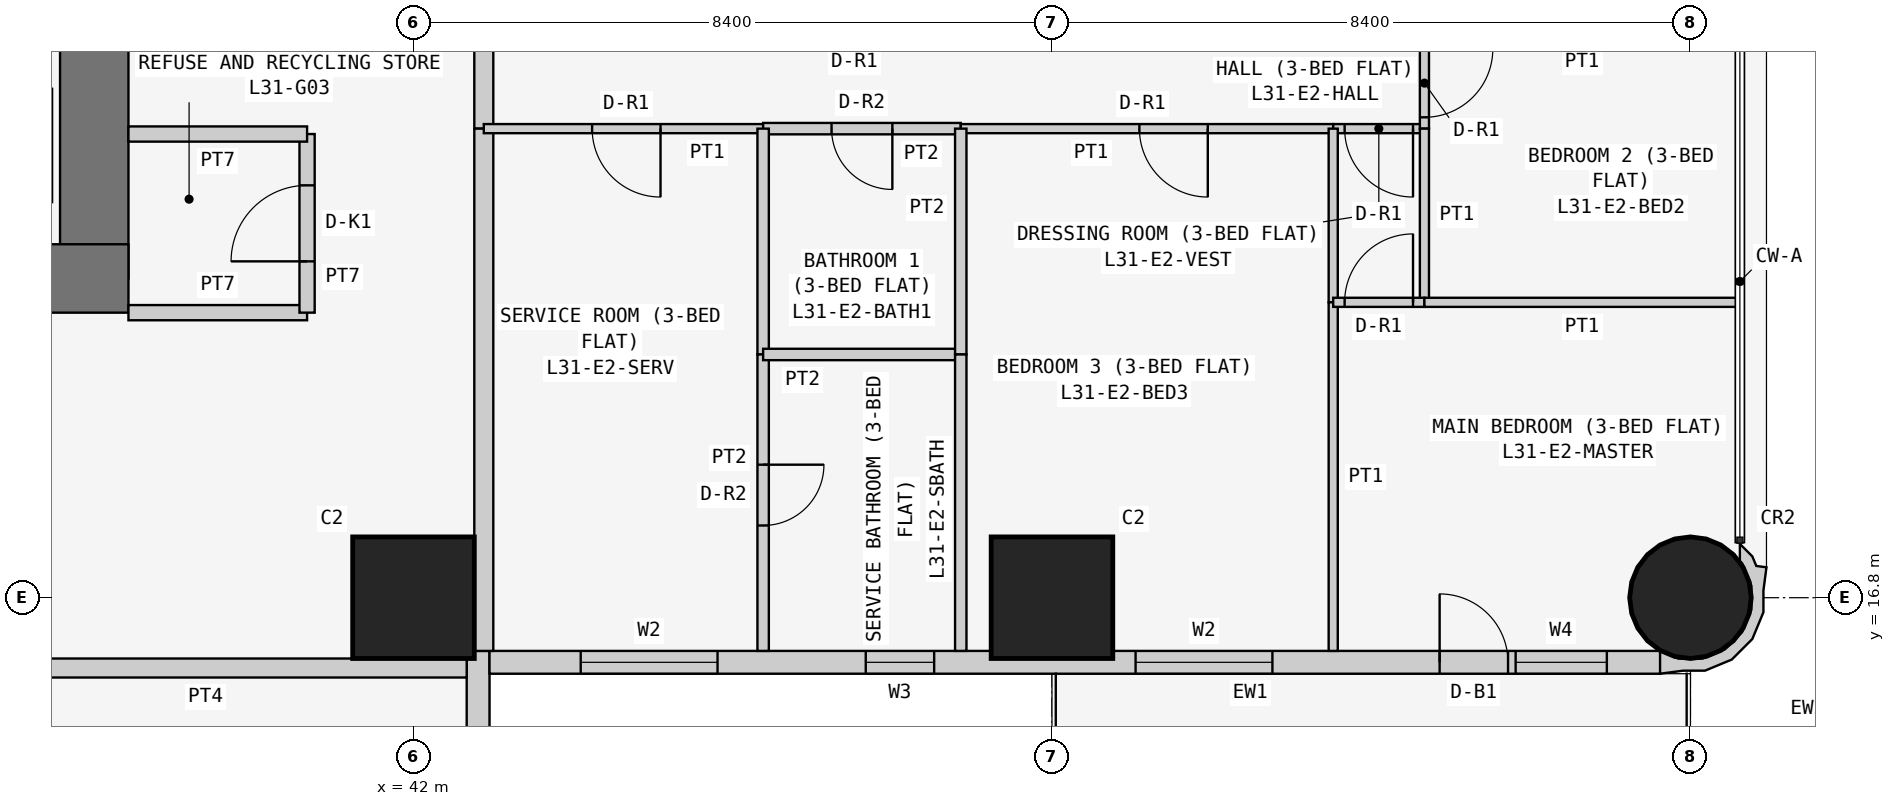
"""IFC4 building model, lengths in metres.
Left out: names, types, materials, properties, quantities, classifications, styles, units other than length and angle.
Written with IfcOpenShell. Run it as: python <this file> out.ifc"""

import sys

from ifc_helpers import new_model, si_unit, direction, frame, frame_2d, origin, origin_2d, place, context, subcontext, project, spatial, polyline, rectangle, circle, outline, extrude, element, fill, save


model = new_model("IFC4")
c1 = context("Model", 3, precision=1e-05, world=origin(), true_north=direction((0.0, 1.0)))
c2 = subcontext(c1, "Body", "Model", "MODEL_VIEW")
j1 = project(units=[si_unit("LENGTHUNIT", "METRE"), si_unit("PLANEANGLEUNIT", "RADIAN")], contexts=[c1])
p1 = place(None, origin())
s1 = spatial("IfcSite", under=j1, at=p1, CompositionType="ELEMENT")
p2 = place(p1, origin())
s2 = spatial("IfcBuilding", under=s1, at=p2, CompositionType="ELEMENT")
p3 = place(p2, frame((0.0, 0.0, 123.3)))
s3 = spatial("IfcBuildingStorey", under=s2, at=p3, CompositionType="ELEMENT", Elevation=123.3)
for number, where, z_axis, x_axis in (
    (1, (42.0, 16.8, 0.0), (0.0, 0.0, 1.0), (1.0, 0.0, 0.0)),
    (2, (50.4, 16.8, 0.0), (0.0, 0.0, 1.0), (1.0, 0.0, 0.0)),
):
    element("IfcColumn", number, at=place(p3, frame(where, z_axis=z_axis, x_axis=x_axis)), inside=s3, PredefinedType="COLUMN", context=c2, shape_type="SweptSolid", body=[
        extrude(rectangle(XDim=1.6, YDim=1.6, at=origin_2d()), origin(), (0.0, 0.0, 1.0), 3.6),
    ])
p4 = place(p3, frame((58.8, 16.8, 0.0), z_axis=(0.0, 0.0, 1.0), x_axis=(1.0, 0.0, 0.0)))
e3 = element("IfcColumn", 3, at=p4, inside=s3, PredefinedType="COLUMN", context=c2, shape_type="SweptSolid", body=[
    extrude(circle(Radius=0.8, at=origin_2d()), origin(), (0.0, 0.0, 1.0), 3.6),
])
p5 = place(p3, frame((21.0, 21.0, 0.0), z_axis=(0.0, 0.0, 1.0), x_axis=(1.0, 0.0, 0.0)))
e4 = element("IfcWall", 4, at=p5, inside=s3, PredefinedType="SHEAR", context=c2, shape_type="SweptSolid", body=[
    extrude(rectangle(XDim=17.25, YDim=0.9, at=frame_2d((8.625, 0.0))), origin(), (0.0, 0.0, 1.0), 3.6),
])
p6 = place(p3, frame((37.8, 21.0, 0.0), z_axis=(0.0, 0.0, 1.0), x_axis=(0.0, 1.0, 0.0)))
e5 = element("IfcWall", 5, at=p6, inside=s3, PredefinedType="SHEAR", context=c2, shape_type="SweptSolid", body=[
    extrude(rectangle(XDim=17.25, YDim=0.9, at=frame_2d((8.625, 0.0))), origin(), (0.0, 0.0, 1.0), 3.6),
])
p7 = place(p6, frame((5.2, 0.0, 0.0)))
e6 = element("IfcOpeningElement", 6, at=p7, cuts=e5, PredefinedType="OPENING", context=c2, shape_type="SweptSolid", body=[
    extrude(rectangle(XDim=1.2, YDim=2.1, at=frame_2d((0.6, 1.05))), frame((0.0, 0.46, 0.0), z_axis=(0.0, -1.0, 0.0), x_axis=(1.0, 0.0, 0.0)), (0.0, 0.0, 1.0), 0.92),
])
p8 = place(p3, frame((42.85, 8.8, 0.0), z_axis=(0.0, 0.0, 1.0), x_axis=(0.0, 1.0, 0.0)))
e7 = element("IfcWall", 7, at=p8, inside=s3, PredefinedType="SOLIDWALL", context=c2, shape_type="SweptSolid", body=[
    extrude(rectangle(XDim=7.3, YDim=0.3, at=frame_2d((3.65, 0.0))), origin(), (0.0, 0.0, 1.0), 3.45),
])
p9 = place(p8, frame((3.1, 0.0, 0.9)))
e8 = element("IfcOpeningElement", 8, at=p9, cuts=e7, PredefinedType="OPENING", context=c2, shape_type="SweptSolid", body=[
    extrude(rectangle(XDim=2.4, YDim=1.5, at=frame_2d((1.2, 0.75))), frame((0.0, 0.16, 0.0), z_axis=(0.0, -1.0, 0.0), x_axis=(1.0, 0.0, 0.0)), (0.0, 0.0, 1.0), 0.32),
])
p10 = place(p8, frame((0.75, 0.0, 0.9)))
e9 = element("IfcOpeningElement", 9, at=p10, cuts=e7, PredefinedType="OPENING", context=c2, shape_type="SweptSolid", body=[
    extrude(rectangle(XDim=1.2, YDim=1.5, at=frame_2d((0.6, 0.75))), frame((0.0, 0.16, 0.0), z_axis=(0.0, -1.0, 0.0), x_axis=(1.0, 0.0, 0.0)), (0.0, 0.0, 1.0), 0.32),
])
p11 = place(p3, frame((43.0, 15.95, 0.0), z_axis=(0.0, 0.0, 1.0), x_axis=(1.0, 0.0, 0.0)))
e10 = element("IfcWall", 10, at=p11, inside=s3, PredefinedType="SOLIDWALL", context=c2, shape_type="SweptSolid", body=[
    extrude(rectangle(XDim=15.4, YDim=0.3, at=frame_2d((7.7, 0.0))), origin(), (0.0, 0.0, 1.0), 3.45),
])
p12 = place(p11, frame((1.2, 0.0, 0.9)))
e11 = element("IfcOpeningElement", 11, at=p12, cuts=e10, PredefinedType="OPENING", context=c2, shape_type="SweptSolid", body=[
    extrude(rectangle(XDim=1.8, YDim=1.5, at=frame_2d((0.9, 0.75))), frame((0.0, 0.16, 0.0), z_axis=(0.0, -1.0, 0.0), x_axis=(1.0, 0.0, 0.0)), (0.0, 0.0, 1.0), 0.32),
])
p13 = place(p11, frame((4.95, 0.0, 1.5)))
e12 = element("IfcOpeningElement", 12, at=p13, cuts=e10, PredefinedType="OPENING", context=c2, shape_type="SweptSolid", body=[
    extrude(rectangle(XDim=0.9, YDim=0.7, at=frame_2d((0.45, 0.35))), frame((0.0, 0.16, 0.0), z_axis=(0.0, -1.0, 0.0), x_axis=(1.0, 0.0, 0.0)), (0.0, 0.0, 1.0), 0.32),
])
p14 = place(p11, frame((8.5, 0.0, 0.9)))
e13 = element("IfcOpeningElement", 13, at=p14, cuts=e10, PredefinedType="OPENING", context=c2, shape_type="SweptSolid", body=[
    extrude(rectangle(XDim=1.8, YDim=1.5, at=frame_2d((0.9, 0.75))), frame((0.0, 0.16, 0.0), z_axis=(0.0, -1.0, 0.0), x_axis=(1.0, 0.0, 0.0)), (0.0, 0.0, 1.0), 0.32),
])
p15 = place(p11, frame((12.5, 0.0, 0.0)))
e14 = element("IfcOpeningElement", 14, at=p15, cuts=e10, PredefinedType="OPENING", context=c2, shape_type="SweptSolid", body=[
    extrude(rectangle(XDim=0.9, YDim=2.4, at=frame_2d((0.45, 1.2))), frame((0.0, 0.16, 0.0), z_axis=(0.0, -1.0, 0.0), x_axis=(1.0, 0.0, 0.0)), (0.0, 0.0, 1.0), 0.32),
])
p16 = place(p11, frame((13.5, 0.0, 0.9)))
e15 = element("IfcOpeningElement", 15, at=p16, cuts=e10, PredefinedType="OPENING", context=c2, shape_type="SweptSolid", body=[
    extrude(rectangle(XDim=1.2, YDim=1.5, at=frame_2d((0.6, 0.75))), frame((0.0, 0.16, 0.0), z_axis=(0.0, -1.0, 0.0), x_axis=(1.0, 0.0, 0.0)), (0.0, 0.0, 1.0), 0.32),
])
p17 = place(p3, frame((58.473, 15.983, 0.0), z_axis=(0.0, 0.0, 1.0), x_axis=(0.93923434088, -0.343276641956, 0.0)))
e16 = element("IfcWall", 16, at=p17, inside=s3, PredefinedType="SOLIDWALL", context=c2, shape_type="SweptSolid", body=[
    extrude(outline(polyline([(0.828, 1.599), (0.697, 1.569), (0.604, 1.67), (0.394, 1.767), (0.471, 1.556), (0.508, 1.539), (0.724, 1.304), (0.834, 1.005), (0.82, 0.686), (0.686, 0.397), (0.451, 0.182), (0.152, 0.073), (-0.116, 0.084), (-0.127, 0.078), (-0.146, 0.071), (-0.006, -0.197), (0.266, -0.055), (0.535, 0.044), (0.817, 0.302), (0.978, 0.648), (0.994, 1.03), (0.895, 1.3), (0.828, 1.599)])), origin(), (0.0, 0.0, 1.0), 3.45),
])
p18 = place(p3, frame((38.25, 20.55, 0.0), z_axis=(0.0, 0.0, 1.0), x_axis=(1.0, 0.0, 0.0)))
e17 = element("IfcWall", 17, at=p18, inside=s3, PredefinedType="PARTITIONING", context=c2, shape_type="SweptSolid", body=[
    extrude(rectangle(XDim=2.35, YDim=0.2, at=frame_2d((1.175, 0.0))), origin(), (0.0, 0.0, 1.0), 3.45),
])
p19 = place(p3, frame((40.6, 20.55, 0.0), z_axis=(0.0, 0.0, 1.0), x_axis=(0.0, 1.0, 0.0)))
e18 = element("IfcWall", 18, at=p19, inside=s3, PredefinedType="PARTITIONING", context=c2, shape_type="SweptSolid", body=[
    extrude(rectangle(XDim=2.35, YDim=0.2, at=frame_2d((1.175, 0.0))), origin(), (0.0, 0.0, 1.0), 3.45),
])
p20 = place(p19, frame((0.675, 0.0, 0.0)))
e19 = element("IfcOpeningElement", 19, at=p20, cuts=e18, PredefinedType="OPENING", context=c2, shape_type="SweptSolid", body=[
    extrude(rectangle(XDim=1.0, YDim=2.1, at=frame_2d((0.5, 1.05))), frame((0.0, 0.11, 0.0), z_axis=(0.0, -1.0, 0.0), x_axis=(1.0, 0.0, 0.0)), (0.0, 0.0, 1.0), 0.22),
])
p21 = place(p3, frame((40.6, 22.9, 0.0), z_axis=(0.0, 0.0, 1.0), x_axis=(-1.0, 0.0, 0.0)))
e20 = element("IfcWall", 20, at=p21, inside=s3, PredefinedType="PARTITIONING", context=c2, shape_type="SweptSolid", body=[
    extrude(rectangle(XDim=2.35, YDim=0.2, at=frame_2d((1.175, 0.0))), origin(), (0.0, 0.0, 1.0), 3.45),
])
p22 = place(p3, frame((42.925, 24.171, 0.0), z_axis=(0.0, 0.0, 1.0), x_axis=(0.0, -1.0, 0.0)))
e21 = element("IfcWall", 21, at=p22, inside=s3, PredefinedType="PARTITIONING", context=c2, shape_type="SweptSolid", body=[
    extrude(rectangle(XDim=1.2, YDim=0.25, at=frame_2d((0.6, 0.0))), origin(), (0.0, 0.0, 1.0), 3.45),
])
for number, where, z_axis, x_axis in (
    (22, (42.925, 22.971, 0.0), (0.0, 0.0, 1.0), (0.0, -1.0, 0.0)),
    (23, (42.7, 15.875, 0.0), (0.0, 0.0, 1.0), (-1.0, 0.0, 0.0)),
):
    element("IfcWall", number, at=place(p3, frame(where, z_axis=z_axis, x_axis=x_axis)), inside=s3, PredefinedType="PARTITIONING", context=c2, shape_type="SweptSolid", body=[
        extrude(rectangle(XDim=6.871, YDim=0.25, at=frame_2d((3.436, 0.0))), origin(), (0.0, 0.0, 1.0), 3.45),
    ])
p23 = place(p3, frame((46.6, 22.971, 0.0), z_axis=(0.0, 0.0, 1.0), x_axis=(-1.0, 0.0, 0.0)))
e24 = element("IfcWall", 24, at=p23, inside=s3, PredefinedType="PARTITIONING", context=c2, shape_type="SweptSolid", body=[
    extrude(rectangle(XDim=3.675, YDim=0.12, at=frame_2d((1.837, 0.0))), origin(), (0.0, 0.0, 1.0), 3.45),
])
p24 = place(p23, frame((1.35, 0.0, 0.0)))
e25 = element("IfcOpeningElement", 25, at=p24, cuts=e24, PredefinedType="OPENING", context=c2, shape_type="SweptSolid", body=[
    extrude(rectangle(XDim=0.9, YDim=2.1, at=frame_2d((0.45, 1.05))), frame((0.0, 0.07, 0.0), z_axis=(0.0, -1.0, 0.0), x_axis=(1.0, 0.0, 0.0)), (0.0, 0.0, 1.0), 0.14),
])
p25 = place(p3, frame((49.2, 22.971, 0.0), z_axis=(0.0, 0.0, 1.0), x_axis=(-1.0, 0.0, 0.0)))
e26 = element("IfcWall", 26, at=p25, inside=s3, PredefinedType="PARTITIONING", context=c2, shape_type="SweptSolid", body=[
    extrude(rectangle(XDim=2.6, YDim=0.15, at=frame_2d((1.3, 0.0))), origin(), (0.0, 0.0, 1.0), 3.45),
])
p26 = place(p25, frame((0.9, 0.0, 0.0)))
e27 = element("IfcOpeningElement", 27, at=p26, cuts=e26, PredefinedType="OPENING", context=c2, shape_type="SweptSolid", body=[
    extrude(rectangle(XDim=0.8, YDim=2.1, at=frame_2d((0.4, 1.05))), frame((0.0, 0.085, 0.0), z_axis=(0.0, -1.0, 0.0), x_axis=(1.0, 0.0, 0.0)), (0.0, 0.0, 1.0), 0.17),
])
p27 = place(p3, frame((54.1, 22.971, 0.0), z_axis=(0.0, 0.0, 1.0), x_axis=(-1.0, 0.0, 0.0)))
e28 = element("IfcWall", 28, at=p27, inside=s3, PredefinedType="PARTITIONING", context=c2, shape_type="SweptSolid", body=[
    extrude(rectangle(XDim=4.9, YDim=0.12, at=frame_2d((2.45, 0.0))), origin(), (0.0, 0.0, 1.0), 3.45),
])
p28 = place(p27, frame((1.65, 0.0, 0.0)))
e29 = element("IfcOpeningElement", 29, at=p28, cuts=e28, PredefinedType="OPENING", context=c2, shape_type="SweptSolid", body=[
    extrude(rectangle(XDim=0.9, YDim=2.1, at=frame_2d((0.45, 1.05))), frame((0.0, 0.07, 0.0), z_axis=(0.0, -1.0, 0.0), x_axis=(1.0, 0.0, 0.0)), (0.0, 0.0, 1.0), 0.14),
])
p29 = place(p3, frame((55.3, 22.971, 0.0), z_axis=(0.0, 0.0, 1.0), x_axis=(-1.0, 0.0, 0.0)))
e30 = element("IfcWall", 30, at=p29, inside=s3, PredefinedType="PARTITIONING", context=c2, shape_type="SweptSolid", body=[
    extrude(rectangle(XDim=1.2, YDim=0.12, at=frame_2d((0.6, 0.0))), origin(), (0.0, 0.0, 1.0), 3.45),
])
p30 = place(p29, frame((0.15, 0.0, 0.0)))
e31 = element("IfcOpeningElement", 31, at=p30, cuts=e30, PredefinedType="OPENING", context=c2, shape_type="SweptSolid", body=[
    extrude(rectangle(XDim=0.9, YDim=2.1, at=frame_2d((0.45, 1.05))), frame((0.0, 0.07, 0.0), z_axis=(0.0, -1.0, 0.0), x_axis=(1.0, 0.0, 0.0)), (0.0, 0.0, 1.0), 0.14),
])
p31 = place(p3, frame((55.3, 24.171, 0.0), z_axis=(0.0, 0.0, 1.0), x_axis=(0.0, -1.0, 0.0)))
e32 = element("IfcWall", 32, at=p31, inside=s3, PredefinedType="PARTITIONING", context=c2, shape_type="SweptSolid", body=[
    extrude(rectangle(XDim=1.2, YDim=0.12, at=frame_2d((0.6, 0.0))), origin(), (0.0, 0.0, 1.0), 3.45),
])
p32 = place(p31, frame((0.151, 0.0, 0.0)))
e33 = element("IfcOpeningElement", 33, at=p32, cuts=e32, PredefinedType="OPENING", context=c2, shape_type="SweptSolid", body=[
    extrude(rectangle(XDim=0.9, YDim=2.1, at=frame_2d((0.45, 1.05))), frame((0.0, 0.07, 0.0), z_axis=(0.0, -1.0, 0.0), x_axis=(1.0, 0.0, 0.0)), (0.0, 0.0, 1.0), 0.14),
])
p33 = place(p3, frame((46.6, 22.971, 0.0), z_axis=(0.0, 0.0, 1.0), x_axis=(0.0, -1.0, 0.0)))
e34 = element("IfcWall", 34, at=p33, inside=s3, PredefinedType="PARTITIONING", context=c2, shape_type="SweptSolid", body=[
    extrude(rectangle(XDim=2.971, YDim=0.15, at=frame_2d((1.485, 0.0))), origin(), (0.0, 0.0, 1.0), 3.45),
])
p34 = place(p3, frame((46.6, 20.0, 0.0), z_axis=(0.0, 0.0, 1.0), x_axis=(0.0, -1.0, 0.0)))
e35 = element("IfcWall", 35, at=p34, inside=s3, PredefinedType="PARTITIONING", context=c2, shape_type="SweptSolid", body=[
    extrude(rectangle(XDim=3.9, YDim=0.15, at=frame_2d((1.95, 0.0))), origin(), (0.0, 0.0, 1.0), 3.45),
])
p35 = place(p34, frame((1.45, 0.0, 0.0)))
e36 = element("IfcOpeningElement", 36, at=p35, cuts=e35, PredefinedType="OPENING", context=c2, shape_type="SweptSolid", body=[
    extrude(rectangle(XDim=0.8, YDim=2.1, at=frame_2d((0.4, 1.05))), frame((0.0, 0.085, 0.0), z_axis=(0.0, -1.0, 0.0), x_axis=(1.0, 0.0, 0.0)), (0.0, 0.0, 1.0), 0.17),
])
p36 = place(p3, frame((49.2, 20.0, 0.0), z_axis=(0.0, 0.0, 1.0), x_axis=(-1.0, 0.0, 0.0)))
e37 = element("IfcWall", 37, at=p36, inside=s3, PredefinedType="PARTITIONING", context=c2, shape_type="SweptSolid", body=[
    extrude(rectangle(XDim=2.6, YDim=0.15, at=frame_2d((1.3, 0.0))), origin(), (0.0, 0.0, 1.0), 3.45),
])
p37 = place(p3, frame((49.2, 22.971, 0.0), z_axis=(0.0, 0.0, 1.0), x_axis=(0.0, -1.0, 0.0)))
e38 = element("IfcWall", 38, at=p37, inside=s3, PredefinedType="PARTITIONING", context=c2, shape_type="SweptSolid", body=[
    extrude(rectangle(XDim=2.971, YDim=0.15, at=frame_2d((1.485, 0.0))), origin(), (0.0, 0.0, 1.0), 3.45),
])
p38 = place(p3, frame((49.2, 20.0, 0.0), z_axis=(0.0, 0.0, 1.0), x_axis=(0.0, -1.0, 0.0)))
e39 = element("IfcWall", 39, at=p38, inside=s3, PredefinedType="PARTITIONING", context=c2, shape_type="SweptSolid", body=[
    extrude(rectangle(XDim=3.9, YDim=0.15, at=frame_2d((1.95, 0.0))), origin(), (0.0, 0.0, 1.0), 3.45),
])
p39 = place(p3, frame((54.1, 22.971, 0.0), z_axis=(0.0, 0.0, 1.0), x_axis=(0.0, -1.0, 0.0)))
e40 = element("IfcWall", 40, at=p39, inside=s3, PredefinedType="PARTITIONING", context=c2, shape_type="SweptSolid", body=[
    extrude(rectangle(XDim=2.285, YDim=0.12, at=frame_2d((1.143, 0.0))), origin(), (0.0, 0.0, 1.0), 3.45),
])
p40 = place(p3, frame((54.1, 20.686, 0.0), z_axis=(0.0, 0.0, 1.0), x_axis=(0.0, -1.0, 0.0)))
e41 = element("IfcWall", 41, at=p40, inside=s3, PredefinedType="PARTITIONING", context=c2, shape_type="SweptSolid", body=[
    extrude(rectangle(XDim=4.586, YDim=0.12, at=frame_2d((2.293, 0.0))), origin(), (0.0, 0.0, 1.0), 3.45),
])
p41 = place(p3, frame((55.3, 22.971, 0.0), z_axis=(0.0, 0.0, 1.0), x_axis=(0.0, -1.0, 0.0)))
e42 = element("IfcWall", 42, at=p41, inside=s3, PredefinedType="PARTITIONING", context=c2, shape_type="SweptSolid", body=[
    extrude(rectangle(XDim=2.285, YDim=0.12, at=frame_2d((1.143, 0.0))), origin(), (0.0, 0.0, 1.0), 3.45),
])
p42 = place(p3, frame((55.3, 20.686, 0.0), z_axis=(0.0, 0.0, 1.0), x_axis=(-1.0, 0.0, 0.0)))
e43 = element("IfcWall", 43, at=p42, inside=s3, PredefinedType="PARTITIONING", context=c2, shape_type="SweptSolid", body=[
    extrude(rectangle(XDim=1.2, YDim=0.12, at=frame_2d((0.6, 0.0))), origin(), (0.0, 0.0, 1.0), 3.45),
])
p43 = place(p42, frame((0.15, 0.0, 0.0)))
e44 = element("IfcOpeningElement", 44, at=p43, cuts=e43, PredefinedType="OPENING", context=c2, shape_type="SweptSolid", body=[
    extrude(rectangle(XDim=0.9, YDim=2.1, at=frame_2d((0.45, 1.05))), frame((0.0, 0.07, 0.0), z_axis=(0.0, -1.0, 0.0), x_axis=(1.0, 0.0, 0.0)), (0.0, 0.0, 1.0), 0.14),
])
p44 = place(p3, frame((59.45, 20.686, 0.0), z_axis=(0.0, 0.0, 1.0), x_axis=(-1.0, 0.0, 0.0)))
e45 = element("IfcWall", 45, at=p44, inside=s3, PredefinedType="PARTITIONING", context=c2, shape_type="SweptSolid", body=[
    extrude(rectangle(XDim=4.15, YDim=0.12, at=frame_2d((2.075, 0.0))), origin(), (0.0, 0.0, 1.0), 3.45),
])
p45 = place(p12, origin())
e46 = element("IfcWindow", 46, at=p45, inside=s3, PartitioningType="SINGLE_PANEL", PredefinedType="WINDOW", context=c2, shape_type="SweptSolid", body=[
    extrude(rectangle(XDim=1.8, YDim=1.5, at=frame_2d((0.9, 0.75))), frame((0.0, 0.03, 0.0), z_axis=(0.0, -1.0, 0.0), x_axis=(1.0, 0.0, 0.0)), (0.0, 0.0, 1.0), 0.06),
])
fill(e11, e46)
p46 = place(p13, origin())
e47 = element("IfcWindow", 47, at=p46, inside=s3, PartitioningType="SINGLE_PANEL", PredefinedType="WINDOW", context=c2, shape_type="SweptSolid", body=[
    extrude(rectangle(XDim=0.9, YDim=0.7, at=frame_2d((0.45, 0.35))), frame((0.0, 0.03, 0.0), z_axis=(0.0, -1.0, 0.0), x_axis=(1.0, 0.0, 0.0)), (0.0, 0.0, 1.0), 0.06),
])
fill(e12, e47)
p47 = place(p14, origin())
e48 = element("IfcWindow", 48, at=p47, inside=s3, PartitioningType="SINGLE_PANEL", PredefinedType="WINDOW", context=c2, shape_type="SweptSolid", body=[
    extrude(rectangle(XDim=1.8, YDim=1.5, at=frame_2d((0.9, 0.75))), frame((0.0, 0.03, 0.0), z_axis=(0.0, -1.0, 0.0), x_axis=(1.0, 0.0, 0.0)), (0.0, 0.0, 1.0), 0.06),
])
fill(e13, e48)
p48 = place(p15, origin())
e49 = element("IfcDoor", 49, at=p48, inside=s3, OperationType="SINGLE_SWING_LEFT", PredefinedType="DOOR", context=c2, shape_type="SweptSolid", body=[
    extrude(rectangle(XDim=0.9, YDim=2.4, at=frame_2d((0.45, 1.2))), frame((0.0, 0.025, 0.0), z_axis=(0.0, -1.0, 0.0), x_axis=(1.0, 0.0, 0.0)), (0.0, 0.0, 1.0), 0.05),
])
fill(e14, e49)
p49 = place(p16, origin())
e50 = element("IfcWindow", 50, at=p49, inside=s3, PartitioningType="SINGLE_PANEL", PredefinedType="WINDOW", context=c2, shape_type="SweptSolid", body=[
    extrude(rectangle(XDim=1.2, YDim=1.5, at=frame_2d((0.6, 0.75))), frame((0.0, 0.03, 0.0), z_axis=(0.0, -1.0, 0.0), x_axis=(1.0, 0.0, 0.0)), (0.0, 0.0, 1.0), 0.06),
])
fill(e15, e50)
p50 = place(p20, origin())
e51 = element("IfcDoor", 51, at=p50, inside=s3, OperationType="SINGLE_SWING_LEFT", PredefinedType="DOOR", context=c2, shape_type="SweptSolid", body=[
    extrude(rectangle(XDim=1.0, YDim=2.1, at=frame_2d((0.5, 1.05))), frame((0.0, 0.025, 0.0), z_axis=(0.0, -1.0, 0.0), x_axis=(1.0, 0.0, 0.0)), (0.0, 0.0, 1.0), 0.05),
])
fill(e19, e51)
p51 = place(p24, origin())
e52 = element("IfcDoor", 52, at=p51, inside=s3, OperationType="SINGLE_SWING_LEFT", PredefinedType="DOOR", context=c2, shape_type="SweptSolid", body=[
    extrude(rectangle(XDim=0.9, YDim=2.1, at=frame_2d((0.45, 1.05))), frame((0.0, 0.025, 0.0), z_axis=(0.0, -1.0, 0.0), x_axis=(1.0, 0.0, 0.0)), (0.0, 0.0, 1.0), 0.05),
])
fill(e25, e52)
p52 = place(p35, origin())
e53 = element("IfcDoor", 53, at=p52, inside=s3, OperationType="SINGLE_SWING_LEFT", PredefinedType="DOOR", context=c2, shape_type="SweptSolid", body=[
    extrude(rectangle(XDim=0.8, YDim=2.1, at=frame_2d((0.4, 1.05))), frame((0.0, 0.025, 0.0), z_axis=(0.0, -1.0, 0.0), x_axis=(1.0, 0.0, 0.0)), (0.0, 0.0, 1.0), 0.05),
])
fill(e36, e53)
p53 = place(p26, origin())
e54 = element("IfcDoor", 54, at=p53, inside=s3, OperationType="SINGLE_SWING_LEFT", PredefinedType="DOOR", context=c2, shape_type="SweptSolid", body=[
    extrude(rectangle(XDim=0.8, YDim=2.1, at=frame_2d((0.4, 1.05))), frame((0.0, 0.025, 0.0), z_axis=(0.0, -1.0, 0.0), x_axis=(1.0, 0.0, 0.0)), (0.0, 0.0, 1.0), 0.05),
])
fill(e27, e54)
p54 = place(p28, origin())
e55 = element("IfcDoor", 55, at=p54, inside=s3, OperationType="SINGLE_SWING_LEFT", PredefinedType="DOOR", context=c2, shape_type="SweptSolid", body=[
    extrude(rectangle(XDim=0.9, YDim=2.1, at=frame_2d((0.45, 1.05))), frame((0.0, 0.025, 0.0), z_axis=(0.0, -1.0, 0.0), x_axis=(1.0, 0.0, 0.0)), (0.0, 0.0, 1.0), 0.05),
])
fill(e29, e55)
p55 = place(p30, origin())
e56 = element("IfcDoor", 56, at=p55, inside=s3, OperationType="SINGLE_SWING_LEFT", PredefinedType="DOOR", context=c2, shape_type="SweptSolid", body=[
    extrude(rectangle(XDim=0.9, YDim=2.1, at=frame_2d((0.45, 1.05))), frame((0.0, 0.025, 0.0), z_axis=(0.0, -1.0, 0.0), x_axis=(1.0, 0.0, 0.0)), (0.0, 0.0, 1.0), 0.05),
])
fill(e31, e56)
p56 = place(p43, frame((0.9, 0.0, 0.0), z_axis=(0.0, 0.0, 1.0), x_axis=(-1.0, 0.0, 0.0)))
e57 = element("IfcDoor", 57, at=p56, inside=s3, OperationType="SINGLE_SWING_RIGHT", PredefinedType="DOOR", context=c2, shape_type="SweptSolid", body=[
    extrude(rectangle(XDim=0.9, YDim=2.1, at=frame_2d((0.45, 1.05))), frame((0.0, 0.025, 0.0), z_axis=(0.0, -1.0, 0.0), x_axis=(1.0, 0.0, 0.0)), (0.0, 0.0, 1.0), 0.05),
])
fill(e44, e57)
p57 = place(p32, origin())
e58 = element("IfcDoor", 58, at=p57, inside=s3, OperationType="SINGLE_SWING_LEFT", PredefinedType="DOOR", context=c2, shape_type="SweptSolid", body=[
    extrude(rectangle(XDim=0.9, YDim=2.1, at=frame_2d((0.45, 1.05))), frame((0.0, 0.025, 0.0), z_axis=(0.0, -1.0, 0.0), x_axis=(1.0, 0.0, 0.0)), (0.0, 0.0, 1.0), 0.05),
])
fill(e33, e58)
save(model, sys.argv[1])
